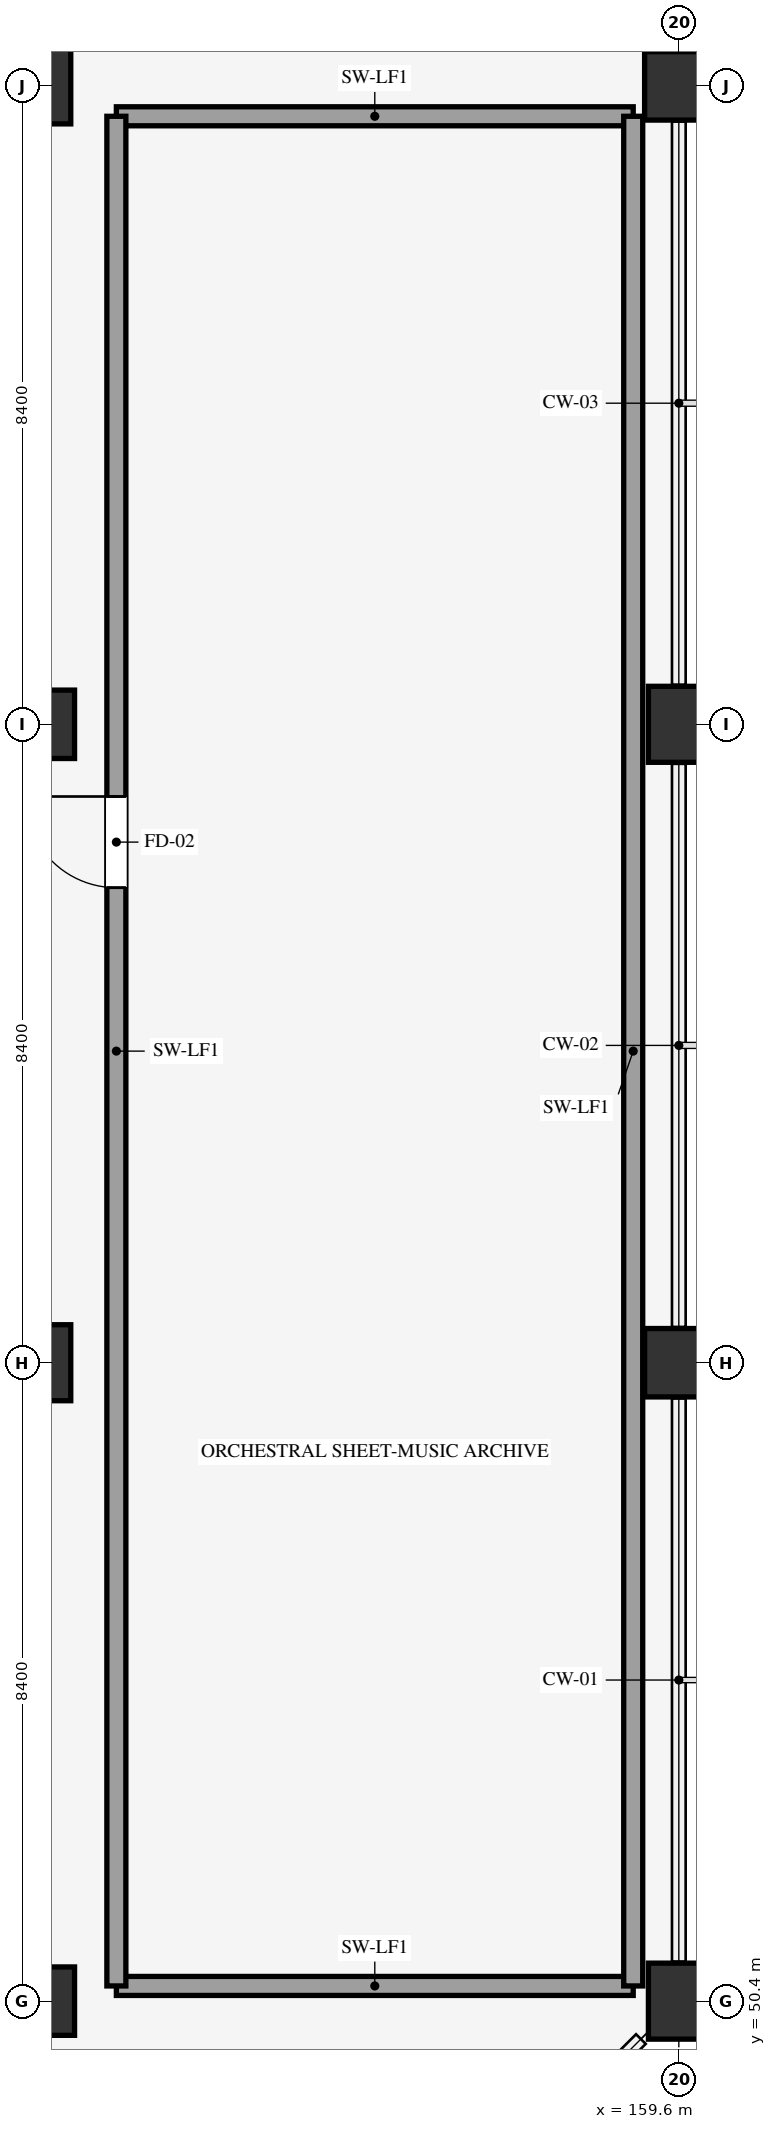
"""IFC4 building model, lengths in metres.
Left out: names, types, materials, properties, quantities, classifications, styles, units other than length and angle.
Written with IfcOpenShell. Run it as: python <this file> out.ifc"""

import sys

from ifc_helpers import new_model, si_unit, direction, frame, frame_2d, origin, origin_2d, place, context, subcontext, project, spatial, rectangle, extrude, element, fill, save


model = new_model("IFC4")
c1 = context("Model", 3, precision=1e-05, world=origin(), true_north=direction((0.0, 1.0)))
c2 = subcontext(c1, "Body", "Model", "MODEL_VIEW")
j1 = project(units=[si_unit("LENGTHUNIT", "METRE"), si_unit("PLANEANGLEUNIT", "RADIAN")], contexts=[c1])
p1 = place(None, origin())
s1 = spatial("IfcSite", under=j1, at=p1, CompositionType="ELEMENT")
p2 = place(p1, origin())
s2 = spatial("IfcBuilding", under=s1, at=p2, CompositionType="ELEMENT")
p3 = place(p2, frame((0.0, 0.0, 61.5)))
s3 = spatial("IfcBuildingStorey", under=s2, at=p3, CompositionType="ELEMENT", Elevation=61.5)
p4 = place(p3, frame((151.2, 50.4, 0.0), z_axis=(0.0, 0.0, 1.0), x_axis=(1.0, 0.0, 0.0)))
e1 = element("IfcColumn", 1, at=p4, inside=s3, PredefinedType="COLUMN", context=c2, shape_type="SweptSolid", body=[
    extrude(rectangle(XDim=0.9, YDim=0.9, at=origin_2d()), origin(), (0.0, 0.0, 1.0), 4.2),
])
p5 = place(p3, frame((151.2, 58.8, 0.0), z_axis=(0.0, 0.0, 1.0), x_axis=(1.0, 0.0, 0.0)))
e2 = element("IfcColumn", 2, at=p5, inside=s3, PredefinedType="COLUMN", context=c2, shape_type="SweptSolid", body=[
    extrude(rectangle(XDim=0.8, YDim=1.0, at=origin_2d()), origin(), (0.0, 0.0, 1.0), 4.2),
])
p6 = place(p3, frame((151.2, 67.2, 0.0), z_axis=(0.0, 0.0, 1.0), x_axis=(1.0, 0.0, 0.0)))
e3 = element("IfcColumn", 3, at=p6, inside=s3, PredefinedType="COLUMN", context=c2, shape_type="SweptSolid", body=[
    extrude(rectangle(XDim=0.9, YDim=0.9, at=origin_2d()), origin(), (0.0, 0.0, 1.0), 4.2),
])
for number, where, z_axis, x_axis in (
    (4, (151.2, 75.6, 0.0), (0.0, 0.0, 1.0), (1.0, 0.0, 0.0)),
    (5, (159.6, 50.4, 0.0), (0.0, 0.0, 1.0), (1.0, 0.0, 0.0)),
):
    element("IfcColumn", number, at=place(p3, frame(where, z_axis=z_axis, x_axis=x_axis)), inside=s3, PredefinedType="COLUMN", context=c2, shape_type="SweptSolid", body=[
        extrude(rectangle(XDim=0.8, YDim=1.0, at=origin_2d()), origin(), (0.0, 0.0, 1.0), 4.2),
    ])
p7 = place(p3, frame((159.6, 58.8, 0.0), z_axis=(0.0, 0.0, 1.0), x_axis=(1.0, 0.0, 0.0)))
e6 = element("IfcColumn", 6, at=p7, inside=s3, PredefinedType="COLUMN", context=c2, shape_type="SweptSolid", body=[
    extrude(rectangle(XDim=0.9, YDim=0.9, at=origin_2d()), origin(), (0.0, 0.0, 1.0), 4.2),
])
p8 = place(p3, frame((159.6, 67.2, 0.0), z_axis=(0.0, 0.0, 1.0), x_axis=(1.0, 0.0, 0.0)))
e7 = element("IfcColumn", 7, at=p8, inside=s3, PredefinedType="COLUMN", context=c2, shape_type="SweptSolid", body=[
    extrude(rectangle(XDim=0.8, YDim=1.0, at=origin_2d()), origin(), (0.0, 0.0, 1.0), 4.2),
])
p9 = place(p3, frame((159.6, 75.6, 0.0), z_axis=(0.0, 0.0, 1.0), x_axis=(1.0, 0.0, 0.0)))
e8 = element("IfcColumn", 8, at=p9, inside=s3, PredefinedType="COLUMN", context=c2, shape_type="SweptSolid", body=[
    extrude(rectangle(XDim=0.9, YDim=0.9, at=origin_2d()), origin(), (0.0, 0.0, 1.0), 4.2),
])
for number, where, z_axis, x_axis in (
    (9, (152.2, 50.6, 0.0), (0.0, 0.0, 1.0), (1.0, 0.0, 0.0)),
    (10, (152.2, 75.2, 0.0), (0.0, 0.0, 1.0), (1.0, 0.0, 0.0)),
):
    element("IfcWall", number, at=place(p3, frame(where, z_axis=z_axis, x_axis=x_axis)), inside=s3, PredefinedType="SHEAR", context=c2, shape_type="SweptSolid", body=[
        extrude(rectangle(XDim=6.8, YDim=0.25, at=frame_2d((3.4, 0.0))), origin(), (0.0, 0.0, 1.0), 3.96),
    ])
p10 = place(p3, frame((152.2, 50.6, 0.0), z_axis=(0.0, 0.0, 1.0), x_axis=(0.0, 1.0, 0.0)))
e11 = element("IfcWall", 11, at=p10, inside=s3, PredefinedType="SHEAR", context=c2, shape_type="SweptSolid", body=[
    extrude(rectangle(XDim=24.6, YDim=0.25, at=frame_2d((12.3, 0.0))), origin(), (0.0, 0.0, 1.0), 3.96),
])
p11 = place(p10, frame((14.45, 0.0, 0.0)))
e12 = element("IfcOpeningElement", 12, at=p11, cuts=e11, PredefinedType="OPENING", context=c2, shape_type="SweptSolid", body=[
    extrude(rectangle(XDim=1.2, YDim=2.15, at=frame_2d((0.6, 1.075))), frame((0.0, 0.135, 0.0), z_axis=(0.0, -1.0, 0.0), x_axis=(1.0, 0.0, 0.0)), (0.0, 0.0, 1.0), 0.27),
])
p12 = place(p3, frame((159.0, 50.6, 0.0), z_axis=(0.0, 0.0, 1.0), x_axis=(0.0, 1.0, 0.0)))
e13 = element("IfcWall", 13, at=p12, inside=s3, PredefinedType="SHEAR", context=c2, shape_type="SweptSolid", body=[
    extrude(rectangle(XDim=24.6, YDim=0.25, at=frame_2d((12.3, 0.0))), origin(), (0.0, 0.0, 1.0), 3.96),
])
p13 = place(p11, origin())
e14 = element("IfcDoor", 14, at=p13, inside=s3, OperationType="SINGLE_SWING_RIGHT", PredefinedType="DOOR", context=c2, shape_type="SweptSolid", body=[
    extrude(rectangle(XDim=1.2, YDim=2.15, at=frame_2d((0.6, 1.075))), frame((0.0, 0.025, 0.0), z_axis=(0.0, -1.0, 0.0), x_axis=(1.0, 0.0, 0.0)), (0.0, 0.0, 1.0), 0.05),
])
fill(e12, e14)
save(model, sys.argv[1])
